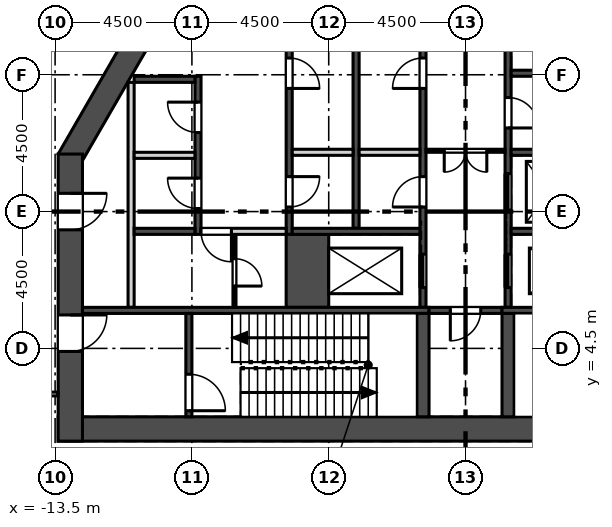
"""IFC4 building model, lengths in metres.
Left out: names, types, materials, properties, quantities, classifications, styles, units other than length and angle.
Written with IfcOpenShell. Run it as: python <this file> out.ifc"""

import sys

from ifc_helpers import new_model, si_unit, direction, frame, frame_2d, origin, place, context, subcontext, project, spatial, rectangle, extrude, element, fill, save


model = new_model("IFC4")
c1 = context("Model", 3, precision=1e-05, world=origin(), true_north=direction((0.0, 1.0)))
c2 = subcontext(c1, "Body", "Model", "MODEL_VIEW")
j1 = project(units=[si_unit("LENGTHUNIT", "METRE"), si_unit("PLANEANGLEUNIT", "RADIAN")], contexts=[c1])
p1 = place(None, origin())
s1 = spatial("IfcSite", under=j1, at=p1, CompositionType="ELEMENT")
p2 = place(p1, origin())
s2 = spatial("IfcBuilding", under=s1, at=p2, CompositionType="ELEMENT")
p3 = place(p2, frame((0.0, 0.0, 339.3)))
s3 = spatial("IfcBuildingStorey", under=s2, at=p3, CompositionType="ELEMENT", Elevation=339.3)
p4 = place(p3, frame((-13.4, 1.85, 0.0), z_axis=(0.0, 0.0, 1.0), x_axis=(1.0, 0.0, 0.0)))
e1 = element("IfcWall", 1, at=p4, inside=s3, PredefinedType="SHEAR", context=c2, shape_type="SweptSolid", body=[
    extrude(rectangle(XDim=26.8, YDim=0.8, at=frame_2d((13.4, 0.0))), origin(), (0.0, 0.0, 1.0), 5.4),
])
p5 = place(p3, frame((-8.719, 18.2, 0.0), z_axis=(0.0, 0.0, 1.0), x_axis=(-0.500015780397, -0.866016292776, 0.0)))
e2 = element("IfcWall", 2, at=p5, inside=s3, PredefinedType="SHEAR", context=c2, shape_type="SweptSolid", body=[
    extrude(rectangle(XDim=8.67, YDim=0.8, at=frame_2d((4.335, 0.0))), origin(), (0.0, 0.0, 1.0), 5.4),
])
p6 = place(p3, frame((-13.0, 10.892, 0.0), z_axis=(0.0, 0.0, 1.0), x_axis=(0.0, -1.0, 0.0)))
e3 = element("IfcWall", 3, at=p6, inside=s3, PredefinedType="SHEAR", context=c2, shape_type="SweptSolid", body=[
    extrude(rectangle(XDim=9.442, YDim=0.8, at=frame_2d((4.721, 0.0))), origin(), (0.0, 0.0, 1.0), 5.4),
])
p7 = place(p6, frame((5.292, 0.0, 0.0)))
e4 = element("IfcOpeningElement", 4, at=p7, cuts=e3, PredefinedType="OPENING", context=c2, shape_type="SweptSolid", body=[
    extrude(rectangle(XDim=1.2, YDim=2.1, at=frame_2d((0.6, 1.05))), frame((0.0, 0.41, 0.0), z_axis=(0.0, -1.0, 0.0), x_axis=(1.0, 0.0, 0.0)), (0.0, 0.0, 1.0), 0.82),
])
p8 = place(p6, frame((1.292, 0.0, 0.0)))
e5 = element("IfcOpeningElement", 5, at=p8, cuts=e3, PredefinedType="OPENING", context=c2, shape_type="SweptSolid", body=[
    extrude(rectangle(XDim=1.2, YDim=2.1, at=frame_2d((0.6, 1.05))), frame((0.0, 0.41, 0.0), z_axis=(0.0, -1.0, 0.0), x_axis=(1.0, 0.0, 0.0)), (0.0, 0.0, 1.0), 0.82),
])
p9 = place(p3, frame((-11.0, 5.85, 0.0), z_axis=(0.0, 0.0, 1.0), x_axis=(0.0, 1.0, 0.0)))
e6 = element("IfcWall", 6, at=p9, inside=s3, PredefinedType="SOLIDWALL", context=c2, shape_type="SweptSolid", body=[
    extrude(rectangle(XDim=7.4, YDim=0.2, at=frame_2d((3.7, 0.0))), origin(), (0.0, 0.0, 1.0), 4.6),
])
p10 = place(p3, frame((-8.8, 8.25, -0.4), z_axis=(0.0, 0.0, 1.0), x_axis=(0.0, 1.0, 0.0)))
e7 = element("IfcWall", 7, at=p10, inside=s3, PredefinedType="SOLIDWALL", context=c2, shape_type="SweptSolid", body=[
    extrude(rectangle(XDim=5.2, YDim=0.2, at=frame_2d((2.6, 0.0))), origin(), (0.0, 0.0, 1.0), 5.0),
])
p11 = place(p10, frame((0.85, 0.0, 0.4)))
e8 = element("IfcOpeningElement", 8, at=p11, cuts=e7, PredefinedType="OPENING", context=c2, shape_type="SweptSolid", body=[
    extrude(rectangle(XDim=1.0, YDim=2.1, at=frame_2d((0.5, 1.05))), frame((0.0, 0.11, 0.0), z_axis=(0.0, -1.0, 0.0), x_axis=(1.0, 0.0, 0.0)), (0.0, 0.0, 1.0), 0.22),
])
p12 = place(p10, frame((3.35, 0.0, 0.4)))
e9 = element("IfcOpeningElement", 9, at=p12, cuts=e7, PredefinedType="OPENING", context=c2, shape_type="SweptSolid", body=[
    extrude(rectangle(XDim=1.0, YDim=2.1, at=frame_2d((0.5, 1.05))), frame((0.0, 0.11, 0.0), z_axis=(0.0, -1.0, 0.0), x_axis=(1.0, 0.0, 0.0)), (0.0, 0.0, 1.0), 0.22),
])
p13 = place(p3, frame((-5.8, 8.25, -0.4), z_axis=(0.0, 0.0, 1.0), x_axis=(0.0, 1.0, 0.0)))
e10 = element("IfcWall", 10, at=p13, inside=s3, PredefinedType="SOLIDWALL", context=c2, shape_type="SweptSolid", body=[
    extrude(rectangle(XDim=8.0, YDim=0.2, at=frame_2d((4.0, 0.0))), origin(), (0.0, 0.0, 1.0), 5.0),
])
p14 = place(p13, frame((0.9, 0.0, 0.4)))
e11 = element("IfcOpeningElement", 11, at=p14, cuts=e10, PredefinedType="OPENING", context=c2, shape_type="SweptSolid", body=[
    extrude(rectangle(XDim=1.0, YDim=2.1, at=frame_2d((0.5, 1.05))), frame((0.0, 0.11, 0.0), z_axis=(0.0, -1.0, 0.0), x_axis=(1.0, 0.0, 0.0)), (0.0, 0.0, 1.0), 0.22),
])
p15 = place(p13, frame((4.8, 0.0, 0.4)))
e12 = element("IfcOpeningElement", 12, at=p15, cuts=e10, PredefinedType="OPENING", context=c2, shape_type="SweptSolid", body=[
    extrude(rectangle(XDim=1.0, YDim=2.1, at=frame_2d((0.5, 1.05))), frame((0.0, 0.11, 0.0), z_axis=(0.0, -1.0, 0.0), x_axis=(1.0, 0.0, 0.0)), (0.0, 0.0, 1.0), 0.22),
])
p16 = place(p3, frame((-3.6, 8.45, -0.4), z_axis=(0.0, 0.0, 1.0), x_axis=(0.0, 1.0, 0.0)))
e13 = element("IfcWall", 13, at=p16, inside=s3, PredefinedType="SOLIDWALL", context=c2, shape_type="SweptSolid", body=[
    extrude(rectangle(XDim=7.8, YDim=0.2, at=frame_2d((3.9, 0.0))), origin(), (0.0, 0.0, 1.0), 5.0),
])
p17 = place(p3, frame((-1.4, 5.85, -0.4), z_axis=(0.0, 0.0, 1.0), x_axis=(0.0, 1.0, 0.0)))
e14 = element("IfcWall", 14, at=p17, inside=s3, PredefinedType="SOLIDWALL", context=c2, shape_type="SweptSolid", body=[
    extrude(rectangle(XDim=11.75, YDim=0.2, at=frame_2d((5.875, 0.0))), origin(), (0.0, 0.0, 1.0), 5.0),
])
p18 = place(p17, frame((0.65, 0.0, 0.4)))
e15 = element("IfcOpeningElement", 15, at=p18, cuts=e14, PredefinedType="OPENING", context=c2, shape_type="SweptSolid", body=[
    extrude(rectangle(XDim=1.1, YDim=2.1, at=frame_2d((0.55, 1.05))), frame((0.0, 0.11, 0.0), z_axis=(0.0, -1.0, 0.0), x_axis=(1.0, 0.0, 0.0)), (0.0, 0.0, 1.0), 0.22),
])
p19 = place(p17, frame((3.3, 0.0, 0.4)))
e16 = element("IfcOpeningElement", 16, at=p19, cuts=e14, PredefinedType="OPENING", context=c2, shape_type="SweptSolid", body=[
    extrude(rectangle(XDim=1.0, YDim=2.1, at=frame_2d((0.5, 1.05))), frame((0.0, 0.11, 0.0), z_axis=(0.0, -1.0, 0.0), x_axis=(1.0, 0.0, 0.0)), (0.0, 0.0, 1.0), 0.22),
])
p20 = place(p17, frame((7.2, 0.0, 0.4)))
e17 = element("IfcOpeningElement", 17, at=p20, cuts=e14, PredefinedType="OPENING", context=c2, shape_type="SweptSolid", body=[
    extrude(rectangle(XDim=1.0, YDim=2.1, at=frame_2d((0.5, 1.05))), frame((0.0, 0.11, 0.0), z_axis=(0.0, -1.0, 0.0), x_axis=(1.0, 0.0, 0.0)), (0.0, 0.0, 1.0), 0.22),
])
p21 = place(p3, frame((1.4, 5.85, -0.4), z_axis=(0.0, 0.0, 1.0), x_axis=(0.0, 1.0, 0.0)))
e18 = element("IfcWall", 18, at=p21, inside=s3, PredefinedType="SOLIDWALL", context=c2, shape_type="SweptSolid", body=[
    extrude(rectangle(XDim=11.75, YDim=0.2, at=frame_2d((5.875, 0.0))), origin(), (0.0, 0.0, 1.0), 5.0),
])
p22 = place(p21, frame((3.2, 0.0, 0.4)))
e19 = element("IfcOpeningElement", 19, at=p22, cuts=e18, PredefinedType="OPENING", context=c2, shape_type="SweptSolid", body=[
    extrude(rectangle(XDim=1.2, YDim=2.1, at=frame_2d((0.6, 1.05))), frame((0.0, 0.11, 0.0), z_axis=(0.0, -1.0, 0.0), x_axis=(1.0, 0.0, 0.0)), (0.0, 0.0, 1.0), 0.22),
])
p23 = place(p21, frame((0.65, 0.0, 0.4)))
e20 = element("IfcOpeningElement", 20, at=p23, cuts=e18, PredefinedType="OPENING", context=c2, shape_type="SweptSolid", body=[
    extrude(rectangle(XDim=1.1, YDim=2.1, at=frame_2d((0.55, 1.05))), frame((0.0, 0.11, 0.0), z_axis=(0.0, -1.0, 0.0), x_axis=(1.0, 0.0, 0.0)), (0.0, 0.0, 1.0), 0.22),
])
p24 = place(p21, frame((5.9, 0.0, 0.4)))
e21 = element("IfcOpeningElement", 21, at=p24, cuts=e18, PredefinedType="OPENING", context=c2, shape_type="SweptSolid", body=[
    extrude(rectangle(XDim=1.0, YDim=2.1, at=frame_2d((0.5, 1.05))), frame((0.0, 0.11, 0.0), z_axis=(0.0, -1.0, 0.0), x_axis=(1.0, 0.0, 0.0)), (0.0, 0.0, 1.0), 0.22),
])
p25 = place(p3, frame((-5.2, 5.85, -0.4), z_axis=(0.0, 0.0, 1.0), x_axis=(0.0, 1.0, 0.0)))
e22 = element("IfcWall", 22, at=p25, inside=s3, PredefinedType="SOLIDWALL", context=c2, shape_type="SweptSolid", body=[
    extrude(rectangle(XDim=2.4, YDim=1.4, at=frame_2d((1.2, 0.0))), origin(), (0.0, 0.0, 1.0), 5.0),
])
p26 = place(p3, frame((-10.9, 8.35, -0.4), z_axis=(0.0, 0.0, 1.0), x_axis=(1.0, 0.0, 0.0)))
e23 = element("IfcWall", 23, at=p26, inside=s3, PredefinedType="SOLIDWALL", context=c2, shape_type="SweptSolid", body=[
    extrude(rectangle(XDim=2.0, YDim=0.2, at=frame_2d((1.0, 0.0))), origin(), (0.0, 0.0, 1.0), 5.0),
])
for number, where, z_axis, x_axis in (
    (24, (-5.7, 8.35, -0.4), (0.0, 0.0, 1.0), (1.0, 0.0, 0.0)),
    (25, (1.5, 8.35, -0.4), (0.0, 0.0, 1.0), (1.0, 0.0, 0.0)),
):
    element("IfcWall", number, at=place(p3, frame(where, z_axis=z_axis, x_axis=x_axis)), inside=s3, PredefinedType="SOLIDWALL", context=c2, shape_type="SweptSolid", body=[
        extrude(rectangle(XDim=4.2, YDim=0.2, at=frame_2d((2.1, 0.0))), origin(), (0.0, 0.0, 1.0), 5.0),
    ])
p27 = place(p3, frame((-12.6, 5.75, -0.4), z_axis=(0.0, 0.0, 1.0), x_axis=(1.0, 0.0, 0.0)))
e26 = element("IfcWall", 26, at=p27, inside=s3, PredefinedType="SOLIDWALL", context=c2, shape_type="SweptSolid", body=[
    extrude(rectangle(XDim=11.4, YDim=0.2, at=frame_2d((5.7, 0.0))), origin(), (0.0, 0.0, 1.0), 5.0),
])
p28 = place(p3, frame((-1.2, 5.75, -0.4), z_axis=(0.0, 0.0, 1.0), x_axis=(1.0, 0.0, 0.0)))
e27 = element("IfcWall", 27, at=p28, inside=s3, PredefinedType="SOLIDWALL", context=c2, shape_type="SweptSolid", body=[
    extrude(rectangle(XDim=2.4, YDim=0.2, at=frame_2d((1.2, 0.0))), origin(), (0.0, 0.0, 1.0), 5.0),
])
p29 = place(p28, frame((0.7, 0.0, 0.4)))
e28 = element("IfcOpeningElement", 28, at=p29, cuts=e27, PredefinedType="OPENING", context=c2, shape_type="SweptSolid", body=[
    extrude(rectangle(XDim=1.0, YDim=2.1, at=frame_2d((0.5, 1.05))), frame((0.0, 0.11, 0.0), z_axis=(0.0, -1.0, 0.0), x_axis=(1.0, 0.0, 0.0)), (0.0, 0.0, 1.0), 0.22),
])
p30 = place(p3, frame((1.2, 5.75, -0.4), z_axis=(0.0, 0.0, 1.0), x_axis=(1.0, 0.0, 0.0)))
e29 = element("IfcWall", 29, at=p30, inside=s3, PredefinedType="SOLIDWALL", context=c2, shape_type="SweptSolid", body=[
    extrude(rectangle(XDim=11.4, YDim=0.2, at=frame_2d((5.7, 0.0))), origin(), (0.0, 0.0, 1.0), 5.0),
])
p31 = place(p3, frame((-9.1, 2.25, -0.4), z_axis=(0.0, 0.0, 1.0), x_axis=(0.0, 1.0, 0.0)))
e30 = element("IfcWall", 30, at=p31, inside=s3, PredefinedType="SOLIDWALL", context=c2, shape_type="SweptSolid", body=[
    extrude(rectangle(XDim=3.4, YDim=0.2, at=frame_2d((1.7, 0.0))), origin(), (0.0, 0.0, 1.0), 5.0),
])
p32 = place(p31, frame((0.2, 0.0, 0.4)))
e31 = element("IfcOpeningElement", 31, at=p32, cuts=e30, PredefinedType="OPENING", context=c2, shape_type="SweptSolid", body=[
    extrude(rectangle(XDim=1.2, YDim=2.1, at=frame_2d((0.6, 1.05))), frame((0.0, 0.11, 0.0), z_axis=(0.0, -1.0, 0.0), x_axis=(1.0, 0.0, 0.0)), (0.0, 0.0, 1.0), 0.22),
])
for number, where, z_axis, x_axis in (
    (32, (-1.4, 2.25, -0.4), (0.0, 0.0, 1.0), (0.0, 1.0, 0.0)),
    (33, (1.4, 2.25, -0.4), (0.0, 0.0, 1.0), (0.0, 1.0, 0.0)),
):
    element("IfcWall", number, at=place(p3, frame(where, z_axis=z_axis, x_axis=x_axis)), inside=s3, PredefinedType="SOLIDWALL", context=c2, shape_type="SweptSolid", body=[
        extrude(rectangle(XDim=3.4, YDim=0.4, at=frame_2d((1.7, 0.0))), origin(), (0.0, 0.0, 1.0), 5.0),
    ])
p33 = place(p3, frame((-10.9, 10.85, 0.0), z_axis=(0.0, 0.0, 1.0), x_axis=(1.0, 0.0, 0.0)))
e34 = element("IfcWall", 34, at=p33, inside=s3, PredefinedType="SOLIDWALL", context=c2, shape_type="SweptSolid", body=[
    extrude(rectangle(XDim=2.0, YDim=0.2, at=frame_2d((1.0, 0.0))), origin(), (0.0, 0.0, 1.0), 4.6),
])
p34 = place(p3, frame((-10.9, 13.35, -0.4), z_axis=(0.0, 0.0, 1.0), x_axis=(1.0, 0.0, 0.0)))
e35 = element("IfcWall", 35, at=p34, inside=s3, PredefinedType="SOLIDWALL", context=c2, shape_type="SweptSolid", body=[
    extrude(rectangle(XDim=2.0, YDim=0.2, at=frame_2d((1.0, 0.0))), origin(), (0.0, 0.0, 1.0), 5.0),
])
for number, where, z_axis, x_axis in (
    (36, (-5.7, 10.95, 0.0), (0.0, 0.0, 1.0), (1.0, 0.0, 0.0)),
    (37, (-3.5, 10.95, 0.0), (0.0, 0.0, 1.0), (1.0, 0.0, 0.0)),
):
    element("IfcWall", number, at=place(p3, frame(where, z_axis=z_axis, x_axis=x_axis)), inside=s3, PredefinedType="SOLIDWALL", context=c2, shape_type="SweptSolid", body=[
        extrude(rectangle(XDim=2.0, YDim=0.2, at=frame_2d((1.0, 0.0))), origin(), (0.0, 0.0, 1.0), 4.6),
    ])
for number, where, z_axis, x_axis in (
    (38, (1.5, 10.95, -0.4), (0.0, 0.0, 1.0), (1.0, 0.0, 0.0)),
    (39, (1.5, 13.55, -0.4), (0.0, 0.0, 1.0), (1.0, 0.0, 0.0)),
):
    element("IfcWall", number, at=place(p3, frame(where, z_axis=z_axis, x_axis=x_axis)), inside=s3, PredefinedType="SOLIDWALL", context=c2, shape_type="SweptSolid", body=[
        extrude(rectangle(XDim=2.0, YDim=0.2, at=frame_2d((1.0, 0.0))), origin(), (0.0, 0.0, 1.0), 5.0),
    ])
p35 = place(p3, frame((-7.6, 5.85, 0.0), z_axis=(0.0, 0.0, 1.0), x_axis=(0.0, 1.0, 0.0)))
e40 = element("IfcWall", 40, at=p35, inside=s3, PredefinedType="PARTITIONING", context=c2, shape_type="SweptSolid", body=[
    extrude(rectangle(XDim=2.4, YDim=0.1, at=frame_2d((1.2, 0.0))), origin(), (0.0, 0.0, 1.0), 4.6),
])
p36 = place(p35, frame((0.7, 0.0, 0.0)))
e41 = element("IfcOpeningElement", 41, at=p36, cuts=e40, PredefinedType="OPENING", context=c2, shape_type="SweptSolid", body=[
    extrude(rectangle(XDim=0.9, YDim=2.1, at=frame_2d((0.45, 1.05))), frame((0.0, 0.06, 0.0), z_axis=(0.0, -1.0, 0.0), x_axis=(1.0, 0.0, 0.0)), (0.0, 0.0, 1.0), 0.12),
])
p37 = place(p3, frame((-8.7, 8.35, 0.0), z_axis=(0.0, 0.0, 1.0), x_axis=(1.0, 0.0, 0.0)))
e42 = element("IfcWall", 42, at=p37, inside=s3, PredefinedType="SOLIDWALL", context=c2, shape_type="SweptSolid", body=[
    extrude(rectangle(XDim=2.8, YDim=0.2, at=frame_2d((1.4, 0.0))), origin(), (0.0, 0.0, 1.0), 4.6),
])
p38 = place(p37, origin())
e43 = element("IfcOpeningElement", 43, at=p38, cuts=e42, PredefinedType="OPENING", context=c2, shape_type="SweptSolid", body=[
    extrude(rectangle(XDim=1.0, YDim=2.1, at=frame_2d((0.5, 1.05))), frame((0.0, 0.11, 0.0), z_axis=(0.0, -1.0, 0.0), x_axis=(1.0, 0.0, 0.0)), (0.0, 0.0, 1.0), 0.22),
])
p39 = place(p3, frame((-1.3, 11.0, 0.0), z_axis=(0.0, 0.0, 1.0), x_axis=(1.0, 0.0, 0.0)))
e44 = element("IfcWall", 44, at=p39, inside=s3, PredefinedType="PARTITIONING", context=c2, shape_type="SweptSolid", body=[
    extrude(rectangle(XDim=2.6, YDim=0.1, at=frame_2d((1.3, 0.0))), origin(), (0.0, 0.0, 1.0), 4.6),
])
p40 = place(p39, frame((0.6, 0.0, 0.0)))
e45 = element("IfcOpeningElement", 45, at=p40, cuts=e44, PredefinedType="OPENING", context=c2, shape_type="SweptSolid", body=[
    extrude(rectangle(XDim=1.4, YDim=2.1, at=frame_2d((0.7, 1.05))), frame((0.0, 0.06, 0.0), z_axis=(0.0, -1.0, 0.0), x_axis=(1.0, 0.0, 0.0)), (0.0, 0.0, 1.0), 0.12),
])
p41 = place(p3, frame((-13.4, 3.0, 0.0), z_axis=(0.0, 0.0, 1.0), x_axis=(-1.0, 0.0, 0.0)))
e46 = element("IfcWall", 46, at=p41, inside=s3, PredefinedType="PARTITIONING", context=c2, shape_type="SweptSolid", body=[
    extrude(rectangle(XDim=2.1, YDim=0.125, at=frame_2d((1.05, 0.0))), origin(), (0.0, 0.0, 1.0), 4.6),
])
p42 = place(p3, frame((-15.5, 11.455, 0.0), z_axis=(0.0, 0.0, 1.0), x_axis=(0.500005024956, 0.866022502605, 0.0)))
e47 = element("IfcWall", 47, at=p42, inside=s3, PredefinedType="PARTITIONING", context=c2, shape_type="SweptSolid", body=[
    extrude(rectangle(XDim=4.388, YDim=0.125, at=frame_2d((2.194, 0.0))), origin(), (0.0, 0.0, 1.0), 4.6),
])
p43 = place(p18, origin())
e48 = element("IfcDoor", 48, at=p43, inside=s3, OperationType="SLIDING_TO_RIGHT", PredefinedType="DOOR", context=c2, shape_type="SweptSolid", body=[
    extrude(rectangle(XDim=1.1, YDim=2.1, at=frame_2d((0.55, 1.05))), frame((0.0, 0.025, 0.0), z_axis=(0.0, -1.0, 0.0), x_axis=(1.0, 0.0, 0.0)), (0.0, 0.0, 1.0), 0.05),
])
fill(e15, e48)
p44 = place(p22, origin())
e49 = element("IfcDoor", 49, at=p44, inside=s3, OperationType="SLIDING_TO_LEFT", PredefinedType="DOOR", context=c2, shape_type="SweptSolid", body=[
    extrude(rectangle(XDim=1.2, YDim=2.1, at=frame_2d((0.6, 1.05))), frame((0.0, 0.025, 0.0), z_axis=(0.0, -1.0, 0.0), x_axis=(1.0, 0.0, 0.0)), (0.0, 0.0, 1.0), 0.05),
])
fill(e19, e49)
p45 = place(p23, origin())
e50 = element("IfcDoor", 50, at=p45, inside=s3, OperationType="SLIDING_TO_RIGHT", PredefinedType="DOOR", context=c2, shape_type="SweptSolid", body=[
    extrude(rectangle(XDim=1.1, YDim=2.1, at=frame_2d((0.55, 1.05))), frame((0.0, 0.025, 0.0), z_axis=(0.0, -1.0, 0.0), x_axis=(1.0, 0.0, 0.0)), (0.0, 0.0, 1.0), 0.05),
])
fill(e20, e50)
p46 = place(p11, origin())
e51 = element("IfcDoor", 51, at=p46, inside=s3, OperationType="SINGLE_SWING_RIGHT", PredefinedType="DOOR", context=c2, shape_type="SweptSolid", body=[
    extrude(rectangle(XDim=1.0, YDim=2.1, at=frame_2d((0.5, 1.05))), frame((0.0, 0.025, 0.0), z_axis=(0.0, -1.0, 0.0), x_axis=(1.0, 0.0, 0.0)), (0.0, 0.0, 1.0), 0.05),
])
fill(e8, e51)
p47 = place(p12, origin())
e52 = element("IfcDoor", 52, at=p47, inside=s3, OperationType="SINGLE_SWING_RIGHT", PredefinedType="DOOR", context=c2, shape_type="SweptSolid", body=[
    extrude(rectangle(XDim=1.0, YDim=2.1, at=frame_2d((0.5, 1.05))), frame((0.0, 0.025, 0.0), z_axis=(0.0, -1.0, 0.0), x_axis=(1.0, 0.0, 0.0)), (0.0, 0.0, 1.0), 0.05),
])
fill(e9, e52)
p48 = place(p14, frame((1.0, 0.0, 0.0), z_axis=(0.0, 0.0, 1.0), x_axis=(-1.0, 0.0, 0.0)))
e53 = element("IfcDoor", 53, at=p48, inside=s3, OperationType="SINGLE_SWING_LEFT", PredefinedType="DOOR", context=c2, shape_type="SweptSolid", body=[
    extrude(rectangle(XDim=1.0, YDim=2.1, at=frame_2d((0.5, 1.05))), frame((0.0, 0.025, 0.0), z_axis=(0.0, -1.0, 0.0), x_axis=(1.0, 0.0, 0.0)), (0.0, 0.0, 1.0), 0.05),
])
fill(e11, e53)
p49 = place(p15, frame((1.0, 0.0, 0.0), z_axis=(0.0, 0.0, 1.0), x_axis=(-1.0, 0.0, 0.0)))
e54 = element("IfcDoor", 54, at=p49, inside=s3, OperationType="SINGLE_SWING_RIGHT", PredefinedType="DOOR", context=c2, shape_type="SweptSolid", body=[
    extrude(rectangle(XDim=1.0, YDim=2.1, at=frame_2d((0.5, 1.05))), frame((0.0, 0.025, 0.0), z_axis=(0.0, -1.0, 0.0), x_axis=(1.0, 0.0, 0.0)), (0.0, 0.0, 1.0), 0.05),
])
fill(e12, e54)
p50 = place(p19, origin())
e55 = element("IfcDoor", 55, at=p50, inside=s3, OperationType="SINGLE_SWING_LEFT", PredefinedType="DOOR", context=c2, shape_type="SweptSolid", body=[
    extrude(rectangle(XDim=1.0, YDim=2.1, at=frame_2d((0.5, 1.05))), frame((0.0, 0.025, 0.0), z_axis=(0.0, -1.0, 0.0), x_axis=(1.0, 0.0, 0.0)), (0.0, 0.0, 1.0), 0.05),
])
fill(e16, e55)
p51 = place(p20, origin())
e56 = element("IfcDoor", 56, at=p51, inside=s3, OperationType="SINGLE_SWING_LEFT", PredefinedType="DOOR", context=c2, shape_type="SweptSolid", body=[
    extrude(rectangle(XDim=1.0, YDim=2.1, at=frame_2d((0.5, 1.05))), frame((0.0, 0.025, 0.0), z_axis=(0.0, -1.0, 0.0), x_axis=(1.0, 0.0, 0.0)), (0.0, 0.0, 1.0), 0.05),
])
fill(e17, e56)
p52 = place(p24, frame((1.0, 0.0, 0.0), z_axis=(0.0, 0.0, 1.0), x_axis=(-1.0, 0.0, 0.0)))
e57 = element("IfcDoor", 57, at=p52, inside=s3, OperationType="SINGLE_SWING_RIGHT", PredefinedType="DOOR", context=c2, shape_type="SweptSolid", body=[
    extrude(rectangle(XDim=1.0, YDim=2.1, at=frame_2d((0.5, 1.05))), frame((0.0, 0.025, 0.0), z_axis=(0.0, -1.0, 0.0), x_axis=(1.0, 0.0, 0.0)), (0.0, 0.0, 1.0), 0.05),
])
fill(e21, e57)
p53 = place(p29, frame((1.0, 0.0, 0.0), z_axis=(0.0, 0.0, 1.0), x_axis=(-1.0, 0.0, 0.0)))
e58 = element("IfcDoor", 58, at=p53, inside=s3, OperationType="SINGLE_SWING_RIGHT", PredefinedType="DOOR", context=c2, shape_type="SweptSolid", body=[
    extrude(rectangle(XDim=1.0, YDim=2.1, at=frame_2d((0.5, 1.05))), frame((0.0, 0.025, 0.0), z_axis=(0.0, -1.0, 0.0), x_axis=(1.0, 0.0, 0.0)), (0.0, 0.0, 1.0), 0.05),
])
fill(e28, e58)
p54 = place(p38, frame((1.0, 0.0, 0.0), z_axis=(0.0, 0.0, 1.0), x_axis=(-1.0, 0.0, 0.0)))
e59 = element("IfcDoor", 59, at=p54, inside=s3, OperationType="SINGLE_SWING_LEFT", PredefinedType="DOOR", context=c2, shape_type="SweptSolid", body=[
    extrude(rectangle(XDim=1.0, YDim=2.1, at=frame_2d((0.5, 1.05))), frame((0.0, 0.025, 0.0), z_axis=(0.0, -1.0, 0.0), x_axis=(1.0, 0.0, 0.0)), (0.0, 0.0, 1.0), 0.05),
])
fill(e43, e59)
p55 = place(p36, frame((0.9, 0.0, 0.0), z_axis=(0.0, 0.0, 1.0), x_axis=(-1.0, 0.0, 0.0)))
e60 = element("IfcDoor", 60, at=p55, inside=s3, OperationType="SINGLE_SWING_RIGHT", PredefinedType="DOOR", context=c2, shape_type="SweptSolid", body=[
    extrude(rectangle(XDim=0.9, YDim=2.1, at=frame_2d((0.45, 1.05))), frame((0.0, 0.025, 0.0), z_axis=(0.0, -1.0, 0.0), x_axis=(1.0, 0.0, 0.0)), (0.0, 0.0, 1.0), 0.05),
])
fill(e41, e60)
p56 = place(p7, origin())
e61 = element("IfcDoor", 61, at=p56, inside=s3, OperationType="SINGLE_SWING_LEFT", PredefinedType="DOOR", context=c2, shape_type="SweptSolid", body=[
    extrude(rectangle(XDim=1.2, YDim=2.1, at=frame_2d((0.6, 1.05))), frame((0.0, 0.025, 0.0), z_axis=(0.0, -1.0, 0.0), x_axis=(1.0, 0.0, 0.0)), (0.0, 0.0, 1.0), 0.05),
])
fill(e4, e61)
p57 = place(p32, frame((1.2, 0.0, 0.0), z_axis=(0.0, 0.0, 1.0), x_axis=(-1.0, 0.0, 0.0)))
e62 = element("IfcDoor", 62, at=p57, inside=s3, OperationType="SINGLE_SWING_RIGHT", PredefinedType="DOOR", context=c2, shape_type="SweptSolid", body=[
    extrude(rectangle(XDim=1.2, YDim=2.1, at=frame_2d((0.6, 1.05))), frame((0.0, 0.025, 0.0), z_axis=(0.0, -1.0, 0.0), x_axis=(1.0, 0.0, 0.0)), (0.0, 0.0, 1.0), 0.05),
])
fill(e31, e62)
p58 = place(p8, origin())
e63 = element("IfcDoor", 63, at=p58, inside=s3, OperationType="SINGLE_SWING_LEFT", PredefinedType="DOOR", context=c2, shape_type="SweptSolid", body=[
    extrude(rectangle(XDim=1.2, YDim=2.1, at=frame_2d((0.6, 1.05))), frame((0.0, 0.025, 0.0), z_axis=(0.0, -1.0, 0.0), x_axis=(1.0, 0.0, 0.0)), (0.0, 0.0, 1.0), 0.05),
])
fill(e5, e63)
p59 = place(p40, frame((1.4, 0.0, 0.0), z_axis=(0.0, 0.0, 1.0), x_axis=(-1.0, 0.0, 0.0)))
e64 = element("IfcDoor", 64, at=p59, inside=s3, OperationType="DOUBLE_DOOR_SINGLE_SWING", PredefinedType="DOOR", context=c2, shape_type="SweptSolid", body=[
    extrude(rectangle(XDim=1.4, YDim=2.1, at=frame_2d((0.7, 1.05))), frame((0.0, 0.025, 0.0), z_axis=(0.0, -1.0, 0.0), x_axis=(1.0, 0.0, 0.0)), (0.0, 0.0, 1.0), 0.05),
])
fill(e45, e64)
save(model, sys.argv[1])
